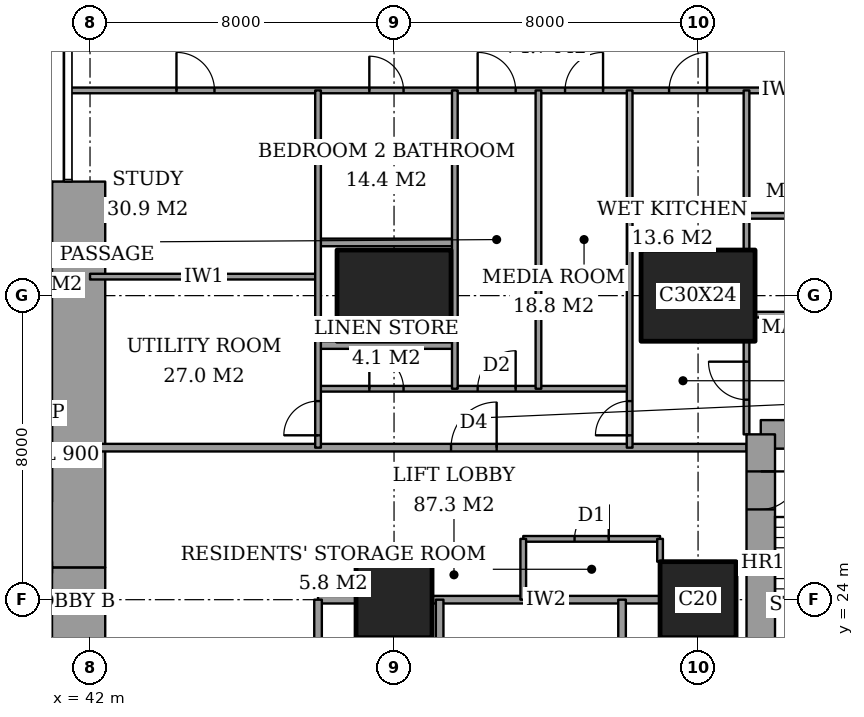
"""IFC4 building model, lengths in metres.
Left out: names, types, materials, properties, quantities, classifications, styles, units other than length and angle.
Written with IfcOpenShell. Run it as: python <this file> out.ifc"""

import sys

from ifc_helpers import new_model, si_unit, direction, frame, frame_2d, origin, origin_2d, place, context, subcontext, project, spatial, rectangle, extrude, element, fill, save


model = new_model("IFC4")
c1 = context("Model", 3, precision=1e-05, world=origin(), true_north=direction((0.0, 1.0)))
c2 = subcontext(c1, "Body", "Model", "MODEL_VIEW")
j1 = project(units=[si_unit("LENGTHUNIT", "METRE"), si_unit("PLANEANGLEUNIT", "RADIAN")], contexts=[c1])
p1 = place(None, origin())
s1 = spatial("IfcSite", under=j1, at=p1, CompositionType="ELEMENT")
p2 = place(p1, origin())
s2 = spatial("IfcBuilding", under=s1, at=p2, CompositionType="ELEMENT")
p3 = place(p2, frame((0.0, 0.0, 72.8)))
s3 = spatial("IfcBuildingStorey", under=s2, at=p3, CompositionType="ELEMENT", Elevation=72.8)
p4 = place(p3, frame((50.0, 24.0, 0.0), z_axis=(0.0, 0.0, 1.0), x_axis=(1.0, 0.0, 0.0)))
e1 = element("IfcColumn", 1, at=p4, inside=s3, PredefinedType="COLUMN", context=c2, shape_type="SweptSolid", body=[
    extrude(rectangle(XDim=2.0, YDim=2.0, at=origin_2d()), origin(), (0.0, 0.0, 1.0), 3.6),
])
p5 = place(p3, frame((50.0, 32.0, 0.0), z_axis=(0.0, 0.0, 1.0), x_axis=(1.0, 0.0, 0.0)))
e2 = element("IfcColumn", 2, at=p5, inside=s3, PredefinedType="COLUMN", context=c2, shape_type="SweptSolid", body=[
    extrude(rectangle(XDim=3.0, YDim=2.4, at=origin_2d()), origin(), (0.0, 0.0, 1.0), 3.6),
])
p6 = place(p3, frame((58.0, 24.0, 0.0), z_axis=(0.0, 0.0, 1.0), x_axis=(1.0, 0.0, 0.0)))
e3 = element("IfcColumn", 3, at=p6, inside=s3, PredefinedType="COLUMN", context=c2, shape_type="SweptSolid", body=[
    extrude(rectangle(XDim=2.0, YDim=2.0, at=origin_2d()), origin(), (0.0, 0.0, 1.0), 3.6),
])
p7 = place(p3, frame((58.0, 32.0, 0.0), z_axis=(0.0, 0.0, 1.0), x_axis=(1.0, 0.0, 0.0)))
e4 = element("IfcColumn", 4, at=p7, inside=s3, PredefinedType="COLUMN", context=c2, shape_type="SweptSolid", body=[
    extrude(rectangle(XDim=3.0, YDim=2.4, at=origin_2d()), origin(), (0.0, 0.0, 1.0), 3.6),
])
p8 = place(p3, frame((41.7, 13.0, 0.0), z_axis=(0.0, 0.0, 1.0), x_axis=(0.0, 1.0, 0.0)))
e5 = element("IfcWall", 5, at=p8, inside=s3, PredefinedType="SHEAR", context=c2, shape_type="SweptSolid", body=[
    extrude(rectangle(XDim=11.85, YDim=1.4, at=frame_2d((5.925, 0.0))), origin(), (0.0, 0.0, 1.0), 3.6),
])
p9 = place(p8, frame((7.5, 0.0, 0.0)))
e6 = element("IfcOpeningElement", 6, at=p9, cuts=e5, PredefinedType="OPENING", context=c2, shape_type="SweptSolid", body=[
    extrude(rectangle(XDim=1.8, YDim=2.4, at=frame_2d((0.9, 1.2))), frame((0.0, 0.71, 0.0), z_axis=(0.0, -1.0, 0.0), x_axis=(1.0, 0.0, 0.0)), (0.0, 0.0, 1.0), 1.42),
])
p10 = place(p3, frame((41.7, 24.85, 0.0), z_axis=(0.0, 0.0, 1.0), x_axis=(0.0, 1.0, 0.0)))
e7 = element("IfcWall", 7, at=p10, inside=s3, PredefinedType="SHEAR", context=c2, shape_type="SweptSolid", body=[
    extrude(rectangle(XDim=10.15, YDim=1.4, at=frame_2d((5.075, 0.0))), origin(), (0.0, 0.0, 1.0), 3.6),
])
p11 = place(p3, frame((64.1, 28.35, 0.0), z_axis=(0.0, 0.0, 1.0), x_axis=(-1.0, 0.0, 0.0)))
e8 = element("IfcWall", 8, at=p11, inside=s3, PredefinedType="SHEAR", context=c2, shape_type="SweptSolid", body=[
    extrude(rectangle(XDim=4.45, YDim=0.75, at=frame_2d((2.225, 0.0))), origin(), (0.0, 0.0, 1.0), 3.6),
])
p12 = place(p3, frame((59.65, 28.35, 0.0), z_axis=(0.0, 0.0, 1.0), x_axis=(0.0, -1.0, 0.0)))
e9 = element("IfcWall", 9, at=p12, inside=s3, PredefinedType="SHEAR", context=c2, shape_type="SweptSolid", body=[
    extrude(rectangle(XDim=8.7, YDim=0.75, at=frame_2d((4.35, 0.0))), origin(), (0.0, 0.0, 1.0), 3.6),
])
p13 = place(p12, frame((0.975, 0.0, 0.0)))
e10 = element("IfcOpeningElement", 10, at=p13, cuts=e9, PredefinedType="OPENING", context=c2, shape_type="SweptSolid", body=[
    extrude(rectangle(XDim=1.0, YDim=2.1, at=frame_2d((0.5, 1.05))), frame((0.0, 0.385, 0.0), z_axis=(0.0, -1.0, 0.0), x_axis=(1.0, 0.0, 0.0)), (0.0, 0.0, 1.0), 0.77),
])
p14 = place(p3, frame((48.0, 24.0, 0.0), z_axis=(0.0, 0.0, 1.0), x_axis=(1.0, 0.0, 0.0)))
e11 = element("IfcWall", 11, at=p14, inside=s3, PredefinedType="PARTITIONING", context=c2, shape_type="SweptSolid", body=[
    extrude(rectangle(XDim=1.0, YDim=0.2, at=frame_2d((0.5, 0.0))), origin(), (0.0, 0.0, 1.0), 3.35),
])
p15 = place(p3, frame((51.0, 24.0, 0.0), z_axis=(0.0, 0.0, 1.0), x_axis=(1.0, 0.0, 0.0)))
e12 = element("IfcWall", 12, at=p15, inside=s3, PredefinedType="PARTITIONING", context=c2, shape_type="SweptSolid", body=[
    extrude(rectangle(XDim=6.0, YDim=0.2, at=frame_2d((3.0, 0.0))), origin(), (0.0, 0.0, 1.0), 3.35),
])
p16 = place(p3, frame((53.4, 25.6, 0.0), z_axis=(0.0, 0.0, 1.0), x_axis=(1.0, 0.0, 0.0)))
e13 = element("IfcWall", 13, at=p16, inside=s3, PredefinedType="PARTITIONING", context=c2, shape_type="SweptSolid", body=[
    extrude(rectangle(XDim=3.6, YDim=0.15, at=frame_2d((1.8, 0.0))), origin(), (0.0, 0.0, 1.0), 3.35),
])
p17 = place(p16, frame((1.35, 0.0, 0.0)))
e14 = element("IfcOpeningElement", 14, at=p17, cuts=e13, PredefinedType="OPENING", context=c2, shape_type="SweptSolid", body=[
    extrude(rectangle(XDim=0.9, YDim=2.1, at=frame_2d((0.45, 1.05))), frame((0.0, 0.085, 0.0), z_axis=(0.0, -1.0, 0.0), x_axis=(1.0, 0.0, 0.0)), (0.0, 0.0, 1.0), 0.17),
])
p18 = place(p3, frame((42.0, 28.0, 0.0), z_axis=(0.0, 0.0, 1.0), x_axis=(1.0, 0.0, 0.0)))
e15 = element("IfcWall", 15, at=p18, inside=s3, PredefinedType="PARTITIONING", context=c2, shape_type="SweptSolid", body=[
    extrude(rectangle(XDim=17.275, YDim=0.2, at=frame_2d((8.637, 0.0))), origin(), (0.0, 0.0, 1.0), 3.35),
])
p19 = place(p18, frame((9.5, 0.0, 0.0)))
e16 = element("IfcOpeningElement", 16, at=p19, cuts=e15, PredefinedType="OPENING", context=c2, shape_type="SweptSolid", body=[
    extrude(rectangle(XDim=1.2, YDim=2.4, at=frame_2d((0.6, 1.2))), frame((0.0, 0.11, 0.0), z_axis=(0.0, -1.0, 0.0), x_axis=(1.0, 0.0, 0.0)), (0.0, 0.0, 1.0), 0.22),
])
p20 = place(p3, frame((48.0, 29.55, 0.0), z_axis=(0.0, 0.0, 1.0), x_axis=(1.0, 0.0, 0.0)))
e17 = element("IfcWall", 17, at=p20, inside=s3, PredefinedType="PARTITIONING", context=c2, shape_type="SweptSolid", body=[
    extrude(rectangle(XDim=8.2, YDim=0.15, at=frame_2d((4.1, 0.0))), origin(), (0.0, 0.0, 1.0), 3.35),
])
p21 = place(p20, frame((4.2, 0.0, 0.0)))
e18 = element("IfcOpeningElement", 18, at=p21, cuts=e17, PredefinedType="OPENING", context=c2, shape_type="SweptSolid", body=[
    extrude(rectangle(XDim=1.0, YDim=2.1, at=frame_2d((0.5, 1.05))), frame((0.0, 0.085, 0.0), z_axis=(0.0, -1.0, 0.0), x_axis=(1.0, 0.0, 0.0)), (0.0, 0.0, 1.0), 0.17),
])
p22 = place(p20, frame((1.35, 0.0, 0.0)))
e19 = element("IfcOpeningElement", 19, at=p22, cuts=e17, PredefinedType="OPENING", context=c2, shape_type="SweptSolid", body=[
    extrude(rectangle(XDim=0.9, YDim=2.1, at=frame_2d((0.45, 1.05))), frame((0.0, 0.085, 0.0), z_axis=(0.0, -1.0, 0.0), x_axis=(1.0, 0.0, 0.0)), (0.0, 0.0, 1.0), 0.17),
])
p23 = place(p3, frame((48.0, 30.7, 0.0), z_axis=(0.0, 0.0, 1.0), x_axis=(1.0, 0.0, 0.0)))
e20 = element("IfcWall", 20, at=p23, inside=s3, PredefinedType="PARTITIONING", context=c2, shape_type="SweptSolid", body=[
    extrude(rectangle(XDim=3.6, YDim=0.2, at=frame_2d((1.8, 0.0))), origin(), (0.0, 0.0, 1.0), 3.35),
])
p24 = place(p3, frame((59.5, 31.5, 0.0), z_axis=(0.0, 0.0, 1.0), x_axis=(1.0, 0.0, 0.0)))
e21 = element("IfcWall", 21, at=p24, inside=s3, PredefinedType="PARTITIONING", context=c2, shape_type="SweptSolid", body=[
    extrude(rectangle(XDim=5.15, YDim=0.15, at=frame_2d((2.575, 0.0))), origin(), (0.0, 0.0, 1.0), 3.35),
])
p25 = place(p3, frame((42.0, 32.5, 0.0), z_axis=(0.0, 0.0, 1.0), x_axis=(1.0, 0.0, 0.0)))
e22 = element("IfcWall", 22, at=p25, inside=s3, PredefinedType="PARTITIONING", context=c2, shape_type="SweptSolid", body=[
    extrude(rectangle(XDim=6.0, YDim=0.15, at=frame_2d((3.0, 0.0))), origin(), (0.0, 0.0, 1.0), 3.35),
])
p26 = place(p3, frame((48.0, 33.4, 0.0), z_axis=(0.0, 0.0, 1.0), x_axis=(1.0, 0.0, 0.0)))
e23 = element("IfcWall", 23, at=p26, inside=s3, PredefinedType="PARTITIONING", context=c2, shape_type="SweptSolid", body=[
    extrude(rectangle(XDim=3.6, YDim=0.2, at=frame_2d((1.8, 0.0))), origin(), (0.0, 0.0, 1.0), 3.35),
])
p27 = place(p3, frame((59.275, 34.1, 0.0), z_axis=(0.0, 0.0, 1.0), x_axis=(1.0, 0.0, 0.0)))
e24 = element("IfcWall", 24, at=p27, inside=s3, PredefinedType="PARTITIONING", context=c2, shape_type="SweptSolid", body=[
    extrude(rectangle(XDim=2.4, YDim=0.15, at=frame_2d((1.2, 0.0))), origin(), (0.0, 0.0, 1.0), 3.35),
])
p28 = place(p3, frame((41.439, 37.4, 0.0), z_axis=(0.0, 0.0, 1.0), x_axis=(1.0, 0.0, 0.0)))
e25 = element("IfcWall", 25, at=p28, inside=s3, PredefinedType="PARTITIONING", context=c2, shape_type="SweptSolid", body=[
    extrude(rectangle(XDim=25.011, YDim=0.15, at=frame_2d((12.505, 0.0))), origin(), (0.0, 0.0, 1.0), 3.35),
])
p29 = place(p28, frame((10.761, 0.0, 0.0)))
e26 = element("IfcOpeningElement", 26, at=p29, cuts=e25, PredefinedType="OPENING", context=c2, shape_type="SweptSolid", body=[
    extrude(rectangle(XDim=1.0, YDim=2.1, at=frame_2d((0.5, 1.05))), frame((0.0, 0.085, 0.0), z_axis=(0.0, -1.0, 0.0), x_axis=(1.0, 0.0, 0.0)), (0.0, 0.0, 1.0), 0.17),
])
p30 = place(p28, frame((20.924, 0.0, 0.0)))
e27 = element("IfcOpeningElement", 27, at=p30, cuts=e25, PredefinedType="OPENING", context=c2, shape_type="SweptSolid", body=[
    extrude(rectangle(XDim=1.0, YDim=2.1, at=frame_2d((0.5, 1.05))), frame((0.0, 0.085, 0.0), z_axis=(0.0, -1.0, 0.0), x_axis=(1.0, 0.0, 0.0)), (0.0, 0.0, 1.0), 0.17),
])
p31 = place(p28, frame((15.799, 0.0, 0.0)))
e28 = element("IfcOpeningElement", 28, at=p31, cuts=e25, PredefinedType="OPENING", context=c2, shape_type="SweptSolid", body=[
    extrude(rectangle(XDim=1.0, YDim=2.1, at=frame_2d((0.5, 1.05))), frame((0.0, 0.085, 0.0), z_axis=(0.0, -1.0, 0.0), x_axis=(1.0, 0.0, 0.0)), (0.0, 0.0, 1.0), 0.17),
])
p32 = place(p28, frame((13.061, 0.0, 0.0)))
e29 = element("IfcOpeningElement", 29, at=p32, cuts=e25, PredefinedType="OPENING", context=c2, shape_type="SweptSolid", body=[
    extrude(rectangle(XDim=1.0, YDim=2.1, at=frame_2d((0.5, 1.05))), frame((0.0, 0.085, 0.0), z_axis=(0.0, -1.0, 0.0), x_axis=(1.0, 0.0, 0.0)), (0.0, 0.0, 1.0), 0.17),
])
p33 = place(p28, frame((7.911, 0.0, 0.0)))
e30 = element("IfcOpeningElement", 30, at=p33, cuts=e25, PredefinedType="OPENING", context=c2, shape_type="SweptSolid", body=[
    extrude(rectangle(XDim=0.9, YDim=2.1, at=frame_2d((0.45, 1.05))), frame((0.0, 0.085, 0.0), z_axis=(0.0, -1.0, 0.0), x_axis=(1.0, 0.0, 0.0)), (0.0, 0.0, 1.0), 0.17),
])
p34 = place(p28, frame((2.836, 0.0, 0.0)))
e31 = element("IfcOpeningElement", 31, at=p34, cuts=e25, PredefinedType="OPENING", context=c2, shape_type="SweptSolid", body=[
    extrude(rectangle(XDim=1.0, YDim=2.1, at=frame_2d((0.5, 1.05))), frame((0.0, 0.085, 0.0), z_axis=(0.0, -1.0, 0.0), x_axis=(1.0, 0.0, 0.0)), (0.0, 0.0, 1.0), 0.17),
])
p35 = place(p3, frame((48.0, 17.0, 0.0), z_axis=(0.0, 0.0, 1.0), x_axis=(0.0, 1.0, 0.0)))
e32 = element("IfcWall", 32, at=p35, inside=s3, PredefinedType="PARTITIONING", context=c2, shape_type="SweptSolid", body=[
    extrude(rectangle(XDim=7.0, YDim=0.2, at=frame_2d((3.5, 0.0))), origin(), (0.0, 0.0, 1.0), 3.35),
])
p36 = place(p35, frame((4.4, 0.0, 0.0)))
e33 = element("IfcOpeningElement", 33, at=p36, cuts=e32, PredefinedType="OPENING", context=c2, shape_type="SweptSolid", body=[
    extrude(rectangle(XDim=1.2, YDim=2.4, at=frame_2d((0.6, 1.2))), frame((0.0, 0.11, 0.0), z_axis=(0.0, -1.0, 0.0), x_axis=(1.0, 0.0, 0.0)), (0.0, 0.0, 1.0), 0.22),
])
p37 = place(p35, frame((1.05, 0.0, 0.0)))
e34 = element("IfcOpeningElement", 34, at=p37, cuts=e32, PredefinedType="OPENING", context=c2, shape_type="SweptSolid", body=[
    extrude(rectangle(XDim=0.9, YDim=2.1, at=frame_2d((0.45, 1.05))), frame((0.0, 0.11, 0.0), z_axis=(0.0, -1.0, 0.0), x_axis=(1.0, 0.0, 0.0)), (0.0, 0.0, 1.0), 0.22),
])
p38 = place(p3, frame((48.0, 28.0, 0.0), z_axis=(0.0, 0.0, 1.0), x_axis=(0.0, 1.0, 0.0)))
e35 = element("IfcWall", 35, at=p38, inside=s3, PredefinedType="PARTITIONING", context=c2, shape_type="SweptSolid", body=[
    extrude(rectangle(XDim=9.4, YDim=0.15, at=frame_2d((4.7, 0.0))), origin(), (0.0, 0.0, 1.0), 3.35),
])
p39 = place(p38, frame((0.325, 0.0, 0.0)))
e36 = element("IfcOpeningElement", 36, at=p39, cuts=e35, PredefinedType="OPENING", context=c2, shape_type="SweptSolid", body=[
    extrude(rectangle(XDim=0.9, YDim=2.1, at=frame_2d((0.45, 1.05))), frame((0.0, 0.085, 0.0), z_axis=(0.0, -1.0, 0.0), x_axis=(1.0, 0.0, 0.0)), (0.0, 0.0, 1.0), 0.17),
])
p40 = place(p3, frame((51.2, 21.6, 0.0), z_axis=(0.0, 0.0, 1.0), x_axis=(0.0, 1.0, 0.0)))
e37 = element("IfcWall", 37, at=p40, inside=s3, PredefinedType="PARTITIONING", context=c2, shape_type="SweptSolid", body=[
    extrude(rectangle(XDim=2.4, YDim=0.2, at=frame_2d((1.2, 0.0))), origin(), (0.0, 0.0, 1.0), 3.35),
])
p41 = place(p3, frame((51.6, 29.55, 0.0), z_axis=(0.0, 0.0, 1.0), x_axis=(0.0, 1.0, 0.0)))
e38 = element("IfcWall", 38, at=p41, inside=s3, PredefinedType="PARTITIONING", context=c2, shape_type="SweptSolid", body=[
    extrude(rectangle(XDim=7.85, YDim=0.15, at=frame_2d((3.925, 0.0))), origin(), (0.0, 0.0, 1.0), 3.35),
])
p42 = place(p3, frame((53.4, 24.0, 0.0), z_axis=(0.0, 0.0, 1.0), x_axis=(0.0, 1.0, 0.0)))
e39 = element("IfcWall", 39, at=p42, inside=s3, PredefinedType="PARTITIONING", context=c2, shape_type="SweptSolid", body=[
    extrude(rectangle(XDim=1.6, YDim=0.15, at=frame_2d((0.8, 0.0))), origin(), (0.0, 0.0, 1.0), 3.35),
])
p43 = place(p3, frame((53.8, 29.55, 0.0), z_axis=(0.0, 0.0, 1.0), x_axis=(0.0, 1.0, 0.0)))
e40 = element("IfcWall", 40, at=p43, inside=s3, PredefinedType="PARTITIONING", context=c2, shape_type="SweptSolid", body=[
    extrude(rectangle(XDim=7.85, YDim=0.15, at=frame_2d((3.925, 0.0))), origin(), (0.0, 0.0, 1.0), 3.35),
])
p44 = place(p3, frame((56.0, 21.6, 0.0), z_axis=(0.0, 0.0, 1.0), x_axis=(0.0, 1.0, 0.0)))
e41 = element("IfcWall", 41, at=p44, inside=s3, PredefinedType="PARTITIONING", context=c2, shape_type="SweptSolid", body=[
    extrude(rectangle(XDim=2.4, YDim=0.2, at=frame_2d((1.2, 0.0))), origin(), (0.0, 0.0, 1.0), 3.35),
])
p45 = place(p3, frame((56.2, 28.0, 0.0), z_axis=(0.0, 0.0, 1.0), x_axis=(0.0, 1.0, 0.0)))
e42 = element("IfcWall", 42, at=p45, inside=s3, PredefinedType="PARTITIONING", context=c2, shape_type="SweptSolid", body=[
    extrude(rectangle(XDim=9.4, YDim=0.15, at=frame_2d((4.7, 0.0))), origin(), (0.0, 0.0, 1.0), 3.35),
])
p46 = place(p45, frame((0.325, 0.0, 0.0)))
e43 = element("IfcOpeningElement", 43, at=p46, cuts=e42, PredefinedType="OPENING", context=c2, shape_type="SweptSolid", body=[
    extrude(rectangle(XDim=0.9, YDim=2.1, at=frame_2d((0.45, 1.05))), frame((0.0, 0.085, 0.0), z_axis=(0.0, -1.0, 0.0), x_axis=(1.0, 0.0, 0.0)), (0.0, 0.0, 1.0), 0.17),
])
p47 = place(p3, frame((57.0, 25.0, 0.0), z_axis=(0.0, 0.0, 1.0), x_axis=(0.0, 1.0, 0.0)))
e44 = element("IfcWall", 44, at=p47, inside=s3, PredefinedType="PARTITIONING", context=c2, shape_type="SweptSolid", body=[
    extrude(rectangle(XDim=0.6, YDim=0.15, at=frame_2d((0.3, 0.0))), origin(), (0.0, 0.0, 1.0), 3.35),
])
p48 = place(p3, frame((59.275, 28.35, 0.0), z_axis=(0.0, 0.0, 1.0), x_axis=(0.0, 1.0, 0.0)))
e45 = element("IfcWall", 45, at=p48, inside=s3, PredefinedType="PARTITIONING", context=c2, shape_type="SweptSolid", body=[
    extrude(rectangle(XDim=2.45, YDim=0.15, at=frame_2d((1.225, 0.0))), origin(), (0.0, 0.0, 1.0), 3.35),
])
p49 = place(p48, frame((0.913, 0.0, 0.0)))
e46 = element("IfcOpeningElement", 46, at=p49, cuts=e45, PredefinedType="OPENING", context=c2, shape_type="SweptSolid", body=[
    extrude(rectangle(XDim=1.0, YDim=2.1, at=frame_2d((0.5, 1.05))), frame((0.0, 0.085, 0.0), z_axis=(0.0, -1.0, 0.0), x_axis=(1.0, 0.0, 0.0)), (0.0, 0.0, 1.0), 0.17),
])
p50 = place(p3, frame((59.275, 33.2, 0.0), z_axis=(0.0, 0.0, 1.0), x_axis=(0.0, 1.0, 0.0)))
e47 = element("IfcWall", 47, at=p50, inside=s3, PredefinedType="PARTITIONING", context=c2, shape_type="SweptSolid", body=[
    extrude(rectangle(XDim=4.2, YDim=0.15, at=frame_2d((2.1, 0.0))), origin(), (0.0, 0.0, 1.0), 3.35),
])
p51 = place(p29, origin())
e48 = element("IfcDoor", 48, at=p51, inside=s3, OperationType="SINGLE_SWING_RIGHT", PredefinedType="DOOR", context=c2, shape_type="SweptSolid", body=[
    extrude(rectangle(XDim=1.0, YDim=2.1, at=frame_2d((0.5, 1.05))), frame((0.0, 0.025, 0.0), z_axis=(0.0, -1.0, 0.0), x_axis=(1.0, 0.0, 0.0)), (0.0, 0.0, 1.0), 0.05),
])
fill(e26, e48)
p52 = place(p49, origin())
e49 = element("IfcDoor", 49, at=p52, inside=s3, OperationType="SINGLE_SWING_LEFT", PredefinedType="DOOR", context=c2, shape_type="SweptSolid", body=[
    extrude(rectangle(XDim=1.0, YDim=2.1, at=frame_2d((0.5, 1.05))), frame((0.0, 0.025, 0.0), z_axis=(0.0, -1.0, 0.0), x_axis=(1.0, 0.0, 0.0)), (0.0, 0.0, 1.0), 0.05),
])
fill(e46, e49)
p53 = place(p31, origin())
e50 = element("IfcDoor", 50, at=p53, inside=s3, OperationType="SINGLE_SWING_LEFT", PredefinedType="DOOR", context=c2, shape_type="SweptSolid", body=[
    extrude(rectangle(XDim=1.0, YDim=2.1, at=frame_2d((0.5, 1.05))), frame((0.0, 0.025, 0.0), z_axis=(0.0, -1.0, 0.0), x_axis=(1.0, 0.0, 0.0)), (0.0, 0.0, 1.0), 0.05),
])
fill(e28, e50)
p54 = place(p46, origin())
e51 = element("IfcDoor", 51, at=p54, inside=s3, OperationType="SINGLE_SWING_RIGHT", PredefinedType="DOOR", context=c2, shape_type="SweptSolid", body=[
    extrude(rectangle(XDim=0.9, YDim=2.1, at=frame_2d((0.45, 1.05))), frame((0.0, 0.025, 0.0), z_axis=(0.0, -1.0, 0.0), x_axis=(1.0, 0.0, 0.0)), (0.0, 0.0, 1.0), 0.05),
])
fill(e43, e51)
p55 = place(p19, origin())
e52 = element("IfcDoor", 52, at=p55, inside=s3, OperationType="SINGLE_SWING_LEFT", PredefinedType="DOOR", context=c2, shape_type="SweptSolid", body=[
    extrude(rectangle(XDim=1.2, YDim=2.4, at=frame_2d((0.6, 1.2))), frame((0.0, 0.025, 0.0), z_axis=(0.0, -1.0, 0.0), x_axis=(1.0, 0.0, 0.0)), (0.0, 0.0, 1.0), 0.05),
])
fill(e16, e52)
p56 = place(p32, origin())
e53 = element("IfcDoor", 53, at=p56, inside=s3, OperationType="SINGLE_SWING_LEFT", PredefinedType="DOOR", context=c2, shape_type="SweptSolid", body=[
    extrude(rectangle(XDim=1.0, YDim=2.1, at=frame_2d((0.5, 1.05))), frame((0.0, 0.025, 0.0), z_axis=(0.0, -1.0, 0.0), x_axis=(1.0, 0.0, 0.0)), (0.0, 0.0, 1.0), 0.05),
])
fill(e29, e53)
p57 = place(p21, origin())
e54 = element("IfcDoor", 54, at=p57, inside=s3, OperationType="SINGLE_SWING_LEFT", PredefinedType="DOOR", context=c2, shape_type="SweptSolid", body=[
    extrude(rectangle(XDim=1.0, YDim=2.1, at=frame_2d((0.5, 1.05))), frame((0.0, 0.025, 0.0), z_axis=(0.0, -1.0, 0.0), x_axis=(1.0, 0.0, 0.0)), (0.0, 0.0, 1.0), 0.05),
])
fill(e18, e54)
p58 = place(p22, origin())
e55 = element("IfcDoor", 55, at=p58, inside=s3, OperationType="SINGLE_SWING_RIGHT", PredefinedType="DOOR", context=c2, shape_type="SweptSolid", body=[
    extrude(rectangle(XDim=0.9, YDim=2.1, at=frame_2d((0.45, 1.05))), frame((0.0, 0.025, 0.0), z_axis=(0.0, -1.0, 0.0), x_axis=(1.0, 0.0, 0.0)), (0.0, 0.0, 1.0), 0.05),
])
fill(e19, e55)
p59 = place(p33, origin())
e56 = element("IfcDoor", 56, at=p59, inside=s3, OperationType="SINGLE_SWING_RIGHT", PredefinedType="DOOR", context=c2, shape_type="SweptSolid", body=[
    extrude(rectangle(XDim=0.9, YDim=2.1, at=frame_2d((0.45, 1.05))), frame((0.0, 0.025, 0.0), z_axis=(0.0, -1.0, 0.0), x_axis=(1.0, 0.0, 0.0)), (0.0, 0.0, 1.0), 0.05),
])
fill(e30, e56)
p60 = place(p34, origin())
e57 = element("IfcDoor", 57, at=p60, inside=s3, OperationType="SINGLE_SWING_RIGHT", PredefinedType="DOOR", context=c2, shape_type="SweptSolid", body=[
    extrude(rectangle(XDim=1.0, YDim=2.1, at=frame_2d((0.5, 1.05))), frame((0.0, 0.025, 0.0), z_axis=(0.0, -1.0, 0.0), x_axis=(1.0, 0.0, 0.0)), (0.0, 0.0, 1.0), 0.05),
])
fill(e31, e57)
p61 = place(p39, origin())
e58 = element("IfcDoor", 58, at=p61, inside=s3, OperationType="SINGLE_SWING_RIGHT", PredefinedType="DOOR", context=c2, shape_type="SweptSolid", body=[
    extrude(rectangle(XDim=0.9, YDim=2.1, at=frame_2d((0.45, 1.05))), frame((0.0, 0.025, 0.0), z_axis=(0.0, -1.0, 0.0), x_axis=(1.0, 0.0, 0.0)), (0.0, 0.0, 1.0), 0.05),
])
fill(e36, e58)
p62 = place(p17, origin())
e59 = element("IfcDoor", 59, at=p62, inside=s3, OperationType="SINGLE_SWING_LEFT", PredefinedType="DOOR", context=c2, shape_type="SweptSolid", body=[
    extrude(rectangle(XDim=0.9, YDim=2.1, at=frame_2d((0.45, 1.05))), frame((0.0, 0.025, 0.0), z_axis=(0.0, -1.0, 0.0), x_axis=(1.0, 0.0, 0.0)), (0.0, 0.0, 1.0), 0.05),
])
fill(e14, e59)
p63 = place(p13, origin())
e60 = element("IfcDoor", 60, at=p63, inside=s3, OperationType="SINGLE_SWING_RIGHT", PredefinedType="DOOR", context=c2, shape_type="SweptSolid", body=[
    extrude(rectangle(XDim=1.0, YDim=2.1, at=frame_2d((0.5, 1.05))), frame((0.0, 0.025, 0.0), z_axis=(0.0, -1.0, 0.0), x_axis=(1.0, 0.0, 0.0)), (0.0, 0.0, 1.0), 0.05),
])
fill(e10, e60)
save(model, sys.argv[1])
